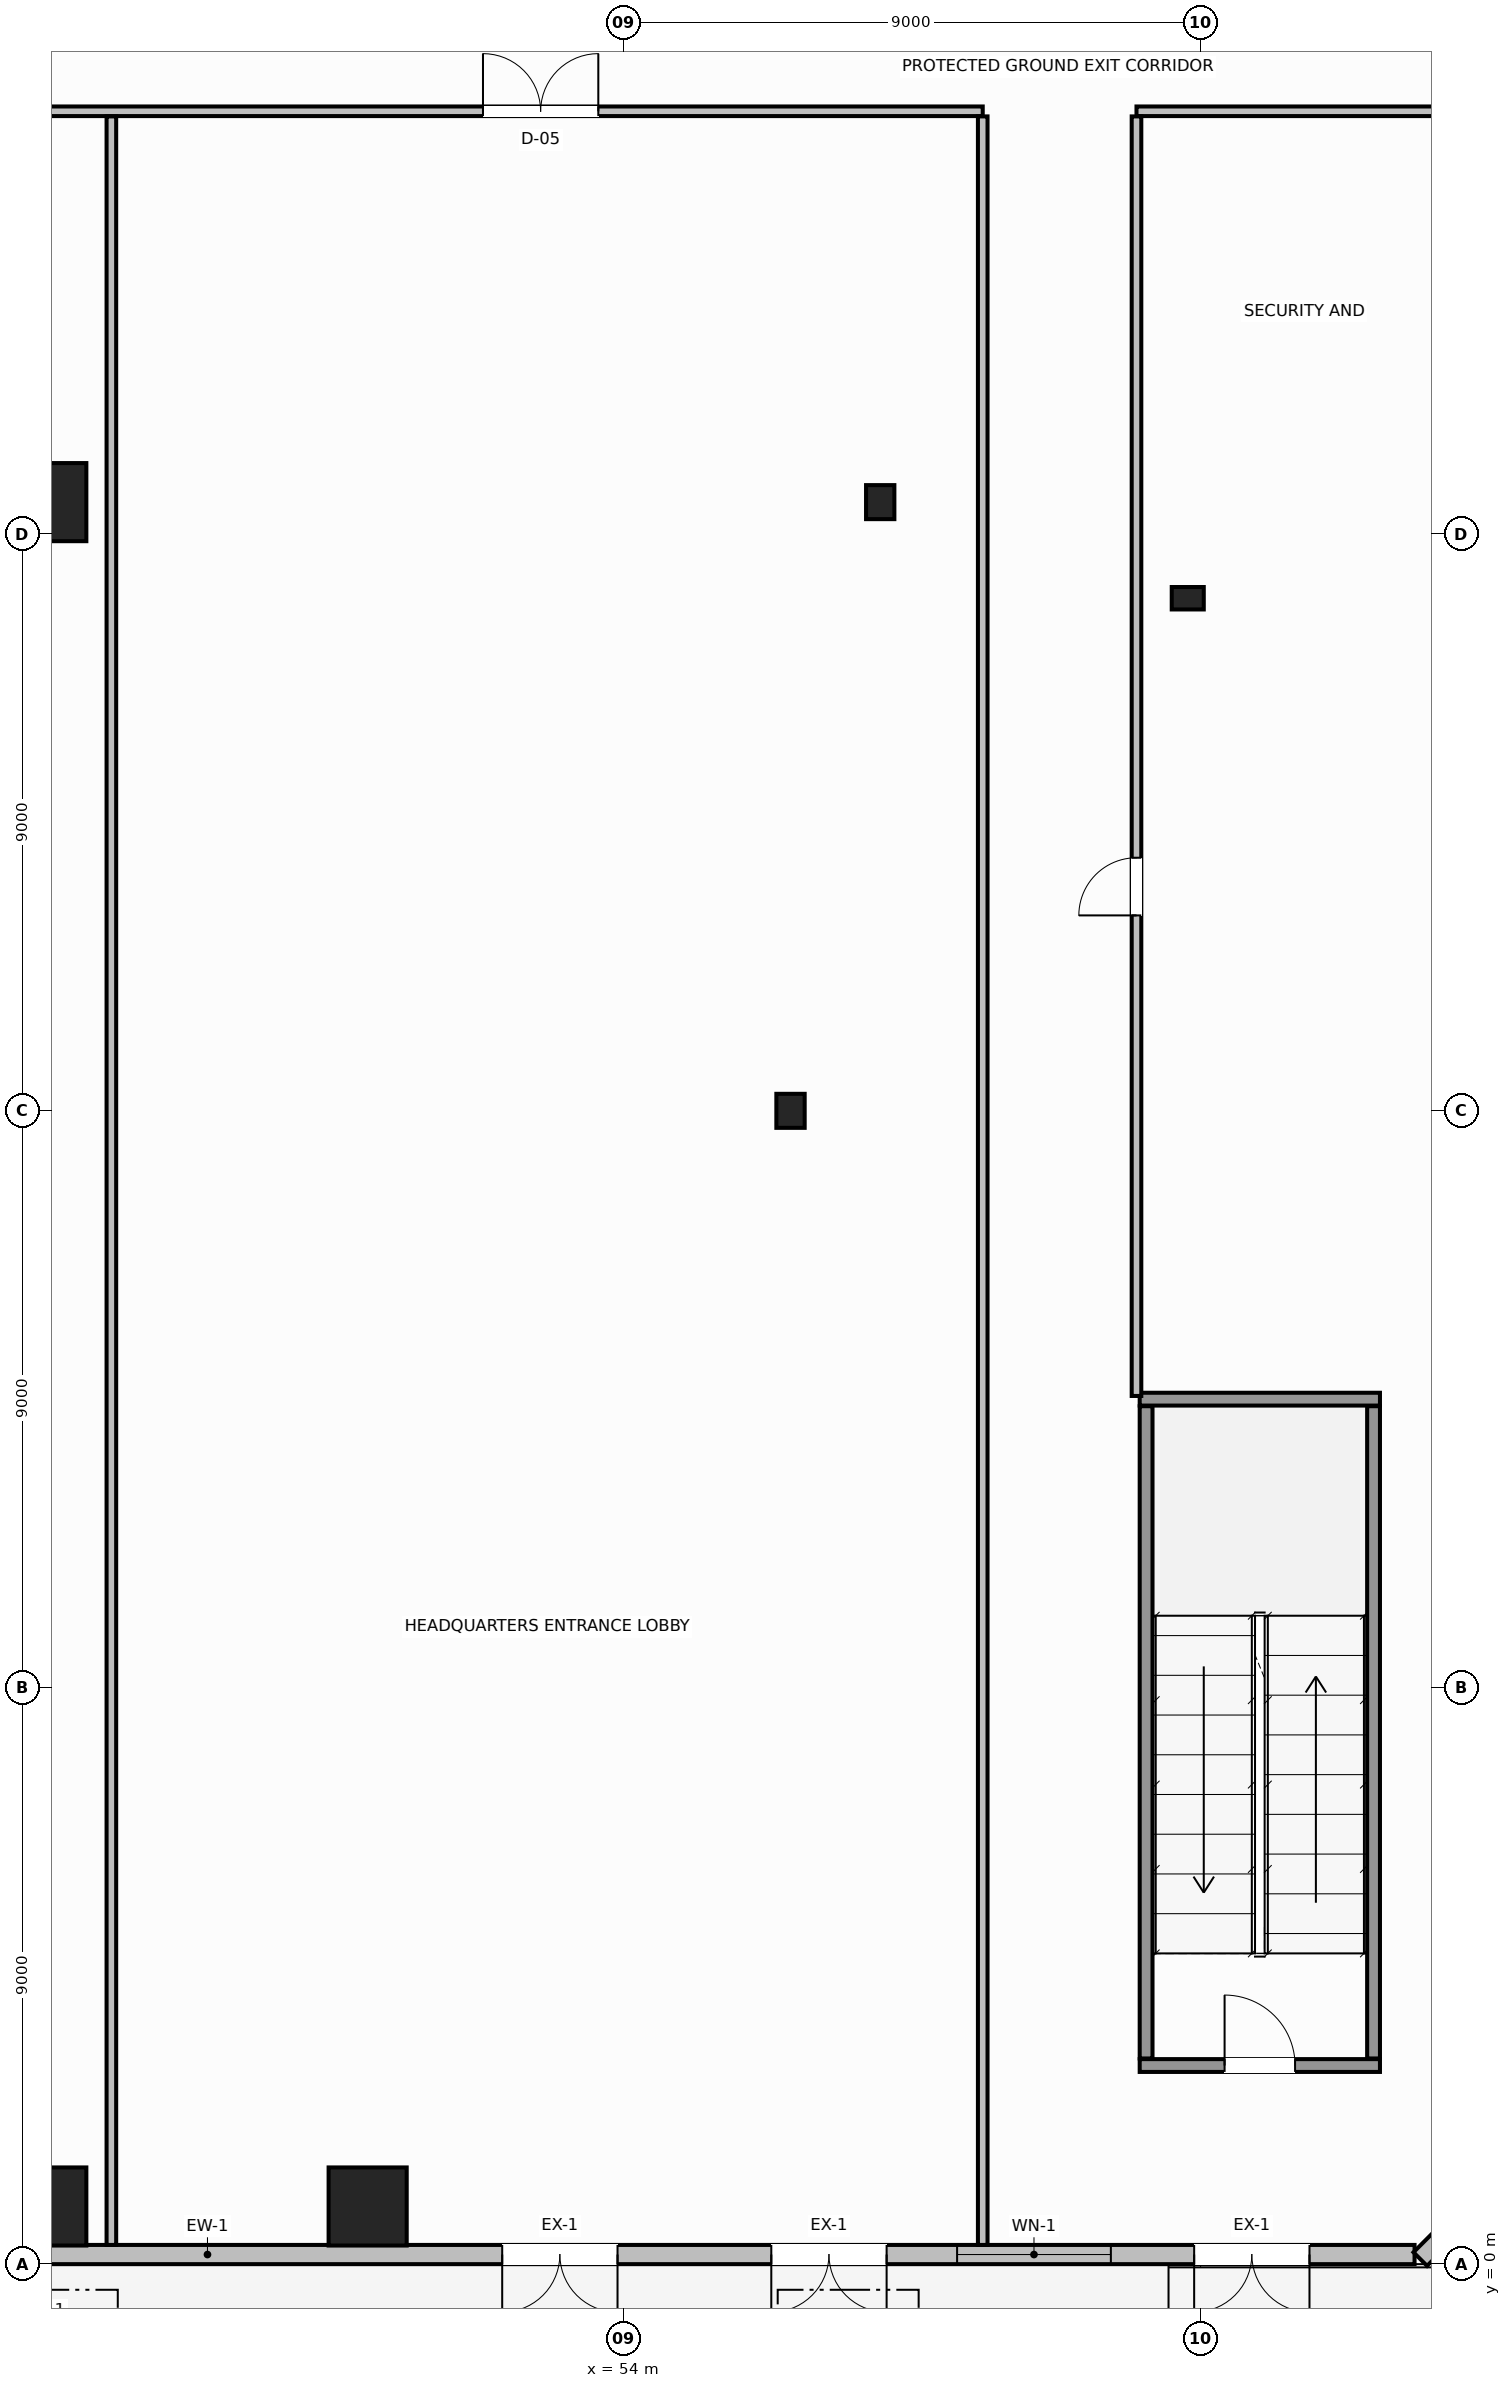
"""IFC4 building model, lengths in metres.
Left out: names, types, materials, properties, quantities, classifications, styles, units other than length and angle.
Written with IfcOpenShell. Run it as: python <this file> out.ifc"""

import sys

from ifc_helpers import new_model, si_unit, direction, frame, frame_2d, origin, origin_2d, place, context, subcontext, project, spatial, rectangle, hollow_circle, i_section, extrude, source, transform, mapped, element, fill, save


model = new_model("IFC4")
c1 = context("Model", 3, precision=1e-05, world=origin(), true_north=direction((0.0, 1.0)))
c2 = subcontext(c1, "Body", "Model", "MODEL_VIEW")
j1 = project(units=[si_unit("LENGTHUNIT", "METRE"), si_unit("PLANEANGLEUNIT", "RADIAN")], contexts=[c1])
p1 = place(None, origin())
s1 = spatial("IfcSite", under=j1, at=p1, CompositionType="ELEMENT")
p2 = place(p1, origin())
s2 = spatial("IfcBuilding", under=s1, at=p2, CompositionType="ELEMENT")
p3 = place(p2, origin())
s3 = spatial("IfcBuildingStorey", under=s2, at=p3, CompositionType="ELEMENT", Elevation=0.0)
m1 = source(origin(), c2, "Body", "SweptSolid", [
    extrude(hollow_circle(Radius=0.61, WallThickness=0.05, at=origin_2d()), origin(), (0.0, 0.0, 1.0), 5.6),
])
for number, where, z_axis, x_axis in (
    (1, (45.0, 0.9, 0.0), (0.0, 0.0, 1.0), (1.0, 0.0, 0.0)),
    (2, (50.0, 0.9, 0.0), (0.0, 0.0, 1.0), (1.0, 0.0, 0.0)),
):
    element("IfcColumn", number, at=place(p3, frame(where, z_axis=z_axis, x_axis=x_axis)), inside=s3, PredefinedType="COLUMN", context=c2, shape_type="MappedRepresentation", body=[
        mapped(m1, transform((0.0, 0.0, 0.0), scale=1.0)),
    ])
m2 = source(origin(), c2, "Body", "SweptSolid", [
    extrude(i_section(OverallWidth=0.442, OverallDepth=0.531, WebThickness=0.065, FlangeThickness=0.076, FilletRadius=0.015, at=origin_2d()), origin(), (0.0, 0.0, 1.0), 5.6),
])
for number, where, z_axis, x_axis in (
    (3, (58.0, 27.5, 0.0), (0.0, 0.0, 1.0), (1.0, 0.0, 0.0)),
    (4, (56.6, 18.0, 0.0), (0.0, 0.0, 1.0), (1.0, 0.0, 0.0)),
):
    element("IfcColumn", number, at=place(p3, frame(where, z_axis=z_axis, x_axis=x_axis)), inside=s3, PredefinedType="COLUMN", context=c2, shape_type="MappedRepresentation", body=[
        mapped(m2, transform((0.0, 0.0, 0.0), scale=1.0)),
    ])
p4 = place(p3, frame((45.0, 27.5, 0.0), z_axis=(0.0, 0.0, 1.0), x_axis=(1.0, 0.0, 0.0)))
e5 = element("IfcColumn", 5, at=p4, inside=s3, PredefinedType="COLUMN", context=c2, shape_type="MappedRepresentation", body=[
    mapped(m1, transform((0.0, 0.0, 0.0), scale=1.0)),
])
m3 = source(origin(), c2, "Body", "SweptSolid", [
    extrude(rectangle(XDim=0.5, YDim=0.35, at=origin_2d()), origin(), (0.0, 0.0, 1.0), 5.32),
])
p5 = place(p3, frame((62.8, 26.0, 0.0), z_axis=(0.0, 0.0, 1.0), x_axis=(1.0, 0.0, 0.0)))
e6 = element("IfcColumn", 6, at=p5, inside=s3, PredefinedType="PILASTER", context=c2, shape_type="MappedRepresentation", body=[
    mapped(m3, transform((0.0, 0.0, 0.0), scale=1.0)),
])
p6 = place(p3, frame((66.34, 0.15, 0.0), z_axis=(0.0, 0.0, 1.0), x_axis=(-1.0, 0.0, 0.0)))
e7 = element("IfcWall", 7, at=p6, inside=s3, PredefinedType="STANDARD", context=c2, shape_type="SweptSolid", body=[
    extrude(rectangle(XDim=64.68, YDim=0.3, at=frame_2d((32.34, 0.0))), origin(), (0.0, 0.0, 1.0), 5.32),
])
p7 = place(p6, frame((54.64, 0.0, 0.0)))
e8 = element("IfcOpeningElement", 8, at=p7, cuts=e7, PredefinedType="OPENING", context=c2, shape_type="SweptSolid", body=[
    extrude(rectangle(XDim=1.8, YDim=2.4, at=frame_2d((0.9, 1.2))), frame((0.0, 0.16, 0.0), z_axis=(0.0, -1.0, 0.0), x_axis=(1.0, 0.0, 0.0)), (0.0, 0.0, 1.0), 0.32),
])
p8 = place(p6, frame((50.24, 0.0, 0.0)))
e9 = element("IfcOpeningElement", 9, at=p8, cuts=e7, PredefinedType="OPENING", context=c2, shape_type="SweptSolid", body=[
    extrude(rectangle(XDim=1.8, YDim=2.4, at=frame_2d((0.9, 1.2))), frame((0.0, 0.16, 0.0), z_axis=(0.0, -1.0, 0.0), x_axis=(1.0, 0.0, 0.0)), (0.0, 0.0, 1.0), 0.32),
])
p9 = place(p6, frame((39.44, 0.0, 0.0)))
e10 = element("IfcOpeningElement", 10, at=p9, cuts=e7, PredefinedType="OPENING", context=c2, shape_type="SweptSolid", body=[
    extrude(rectangle(XDim=1.8, YDim=2.4, at=frame_2d((0.9, 1.2))), frame((0.0, 0.16, 0.0), z_axis=(0.0, -1.0, 0.0), x_axis=(1.0, 0.0, 0.0)), (0.0, 0.0, 1.0), 0.32),
])
p10 = place(p6, frame((31.44, 0.0, 0.0)))
e11 = element("IfcOpeningElement", 11, at=p10, cuts=e7, PredefinedType="OPENING", context=c2, shape_type="SweptSolid", body=[
    extrude(rectangle(XDim=1.8, YDim=2.4, at=frame_2d((0.9, 1.2))), frame((0.0, 0.16, 0.0), z_axis=(0.0, -1.0, 0.0), x_axis=(1.0, 0.0, 0.0)), (0.0, 0.0, 1.0), 0.32),
])
p11 = place(p6, frame((23.44, 0.0, 0.0)))
e12 = element("IfcOpeningElement", 12, at=p11, cuts=e7, PredefinedType="OPENING", context=c2, shape_type="SweptSolid", body=[
    extrude(rectangle(XDim=1.8, YDim=2.4, at=frame_2d((0.9, 1.2))), frame((0.0, 0.16, 0.0), z_axis=(0.0, -1.0, 0.0), x_axis=(1.0, 0.0, 0.0)), (0.0, 0.0, 1.0), 0.32),
])
p12 = place(p6, frame((12.44, 0.0, 0.0)))
e13 = element("IfcOpeningElement", 13, at=p12, cuts=e7, PredefinedType="OPENING", context=c2, shape_type="SweptSolid", body=[
    extrude(rectangle(XDim=1.8, YDim=2.4, at=frame_2d((0.9, 1.2))), frame((0.0, 0.16, 0.0), z_axis=(0.0, -1.0, 0.0), x_axis=(1.0, 0.0, 0.0)), (0.0, 0.0, 1.0), 0.32),
])
p13 = place(p6, frame((8.24, 0.0, 0.0)))
e14 = element("IfcOpeningElement", 14, at=p13, cuts=e7, PredefinedType="OPENING", context=c2, shape_type="SweptSolid", body=[
    extrude(rectangle(XDim=1.8, YDim=2.4, at=frame_2d((0.9, 1.2))), frame((0.0, 0.16, 0.0), z_axis=(0.0, -1.0, 0.0), x_axis=(1.0, 0.0, 0.0)), (0.0, 0.0, 1.0), 0.32),
])
p14 = place(p6, frame((1.64, 0.0, 0.0)))
e15 = element("IfcOpeningElement", 15, at=p14, cuts=e7, PredefinedType="OPENING", context=c2, shape_type="SweptSolid", body=[
    extrude(rectangle(XDim=1.8, YDim=2.4, at=frame_2d((0.9, 1.2))), frame((0.0, 0.16, 0.0), z_axis=(0.0, -1.0, 0.0), x_axis=(1.0, 0.0, 0.0)), (0.0, 0.0, 1.0), 0.32),
])
p15 = place(p6, frame((60.34, 0.0, 1.1)))
e16 = element("IfcOpeningElement", 16, at=p15, cuts=e7, PredefinedType="OPENING", context=c2, shape_type="SweptSolid", body=[
    extrude(rectangle(XDim=2.4, YDim=2.2, at=frame_2d((1.2, 1.1))), frame((0.0, 0.16, 0.0), z_axis=(0.0, -1.0, 0.0), x_axis=(1.0, 0.0, 0.0)), (0.0, 0.0, 1.0), 0.32),
])
p16 = place(p6, frame((34.94, 0.0, 1.1)))
e17 = element("IfcOpeningElement", 17, at=p16, cuts=e7, PredefinedType="OPENING", context=c2, shape_type="SweptSolid", body=[
    extrude(rectangle(XDim=2.4, YDim=2.2, at=frame_2d((1.2, 1.1))), frame((0.0, 0.16, 0.0), z_axis=(0.0, -1.0, 0.0), x_axis=(1.0, 0.0, 0.0)), (0.0, 0.0, 1.0), 0.32),
])
p17 = place(p6, frame((27.34, 0.0, 1.1)))
e18 = element("IfcOpeningElement", 18, at=p17, cuts=e7, PredefinedType="OPENING", context=c2, shape_type="SweptSolid", body=[
    extrude(rectangle(XDim=2.4, YDim=2.2, at=frame_2d((1.2, 1.1))), frame((0.0, 0.16, 0.0), z_axis=(0.0, -1.0, 0.0), x_axis=(1.0, 0.0, 0.0)), (0.0, 0.0, 1.0), 0.32),
])
p18 = place(p6, frame((4.74, 0.0, 1.1)))
e19 = element("IfcOpeningElement", 19, at=p18, cuts=e7, PredefinedType="OPENING", context=c2, shape_type="SweptSolid", body=[
    extrude(rectangle(XDim=2.4, YDim=2.2, at=frame_2d((1.2, 1.1))), frame((0.0, 0.16, 0.0), z_axis=(0.0, -1.0, 0.0), x_axis=(1.0, 0.0, 0.0)), (0.0, 0.0, 1.0), 0.32),
])
p19 = place(p3, frame((67.921, 1.571, 0.0), z_axis=(0.0, 0.0, 1.0), x_axis=(-0.707106781187, -0.707106781187, 0.0)))
e20 = element("IfcWall", 20, at=p19, inside=s3, PredefinedType="STANDARD", context=c2, shape_type="SweptSolid", body=[
    extrude(rectangle(XDim=2.109, YDim=0.3, at=frame_2d((1.055, 0.0))), origin(), (0.0, 0.0, 1.0), 5.32),
])
p20 = place(p3, frame((62.05, 3.1, 0.0), z_axis=(0.0, 0.0, 1.0), x_axis=(1.0, 0.0, 0.0)))
e21 = element("IfcWall", 21, at=p20, inside=s3, PredefinedType="SOLIDWALL", context=c2, shape_type="SweptSolid", body=[
    extrude(rectangle(XDim=3.75, YDim=0.2, at=frame_2d((1.875, 0.0))), origin(), (0.0, 0.0, 1.0), 5.6),
])
p21 = place(p20, frame((1.325, 0.0, 0.0)))
e22 = element("IfcOpeningElement", 22, at=p21, cuts=e21, PredefinedType="OPENING", context=c2, shape_type="SweptSolid", body=[
    extrude(rectangle(XDim=1.1, YDim=2.15, at=frame_2d((0.55, 1.075))), frame((0.0, 0.11, 0.0), z_axis=(0.0, -1.0, 0.0), x_axis=(1.0, 0.0, 0.0)), (0.0, 0.0, 1.0), 0.22),
])
p22 = place(p3, frame((62.05, 13.5, 0.0), z_axis=(0.0, 0.0, 1.0), x_axis=(1.0, 0.0, 0.0)))
e23 = element("IfcWall", 23, at=p22, inside=s3, PredefinedType="SOLIDWALL", context=c2, shape_type="SweptSolid", body=[
    extrude(rectangle(XDim=3.75, YDim=0.2, at=frame_2d((1.875, 0.0))), origin(), (0.0, 0.0, 1.0), 5.6),
])
for number, where, z_axis, x_axis in (
    (24, (62.15, 3.21, 0.0), (0.0, 0.0, 1.0), (0.0, 1.0, 0.0)),
    (25, (65.7, 3.21, 0.0), (0.0, 0.0, 1.0), (0.0, 1.0, 0.0)),
):
    element("IfcWall", number, at=place(p3, frame(where, z_axis=z_axis, x_axis=x_axis)), inside=s3, PredefinedType="SOLIDWALL", context=c2, shape_type="SweptSolid", body=[
        extrude(rectangle(XDim=10.18, YDim=0.2, at=frame_2d((5.09, 0.0))), origin(), (0.0, 0.0, 1.0), 5.6),
    ])
p23 = place(p3, frame((0.3, 33.6, 0.0), z_axis=(0.0, 0.0, 1.0), x_axis=(1.0, 0.0, 0.0)))
e26 = element("IfcWall", 26, at=p23, inside=s3, PredefinedType="PARTITIONING", context=c2, shape_type="SweptSolid", body=[
    extrude(rectangle(XDim=59.3, YDim=0.15, at=frame_2d((29.65, 0.0))), origin(), (0.0, 0.0, 1.0), 5.32),
])
p24 = place(p23, frame((3.5, 0.0, 0.0)))
e27 = element("IfcOpeningElement", 27, at=p24, cuts=e26, PredefinedType="OPENING", context=c2, shape_type="SweptSolid", body=[
    extrude(rectangle(XDim=1.1, YDim=2.15, at=frame_2d((0.55, 1.075))), frame((0.0, 0.085, 0.0), z_axis=(0.0, -1.0, 0.0), x_axis=(1.0, 0.0, 0.0)), (0.0, 0.0, 1.0), 0.17),
])
p25 = place(p23, frame((14.0, 0.0, 0.0)))
e28 = element("IfcOpeningElement", 28, at=p25, cuts=e26, PredefinedType="OPENING", context=c2, shape_type="SweptSolid", body=[
    extrude(rectangle(XDim=1.8, YDim=2.25, at=frame_2d((0.9, 1.125))), frame((0.0, 0.085, 0.0), z_axis=(0.0, -1.0, 0.0), x_axis=(1.0, 0.0, 0.0)), (0.0, 0.0, 1.0), 0.17),
])
p26 = place(p23, frame((32.5, 0.0, 0.0)))
e29 = element("IfcOpeningElement", 29, at=p26, cuts=e26, PredefinedType="OPENING", context=c2, shape_type="SweptSolid", body=[
    extrude(rectangle(XDim=1.8, YDim=2.25, at=frame_2d((0.9, 1.125))), frame((0.0, 0.085, 0.0), z_axis=(0.0, -1.0, 0.0), x_axis=(1.0, 0.0, 0.0)), (0.0, 0.0, 1.0), 0.17),
])
p27 = place(p23, frame((51.5, 0.0, 0.0)))
e30 = element("IfcOpeningElement", 30, at=p27, cuts=e26, PredefinedType="OPENING", context=c2, shape_type="SweptSolid", body=[
    extrude(rectangle(XDim=1.8, YDim=2.25, at=frame_2d((0.9, 1.125))), frame((0.0, 0.085, 0.0), z_axis=(0.0, -1.0, 0.0), x_axis=(1.0, 0.0, 0.0)), (0.0, 0.0, 1.0), 0.17),
])
p28 = place(p3, frame((62.0, 33.6, 0.0), z_axis=(0.0, 0.0, 1.0), x_axis=(1.0, 0.0, 0.0)))
e31 = element("IfcWall", 31, at=p28, inside=s3, PredefinedType="PARTITIONING", context=c2, shape_type="SweptSolid", body=[
    extrude(rectangle(XDim=5.7, YDim=0.15, at=frame_2d((2.85, 0.0))), origin(), (0.0, 0.0, 1.0), 5.32),
])
p29 = place(p3, frame((59.6, 0.3, 0.0), z_axis=(0.0, 0.0, 1.0), x_axis=(0.0, 1.0, 0.0)))
e32 = element("IfcWall", 32, at=p29, inside=s3, PredefinedType="PARTITIONING", context=c2, shape_type="SweptSolid", body=[
    extrude(rectangle(XDim=33.22, YDim=0.15, at=frame_2d((16.61, 0.0))), origin(), (0.0, 0.0, 1.0), 4.4),
])
p30 = place(p3, frame((62.0, 13.55, 0.0), z_axis=(0.0, 0.0, 1.0), x_axis=(0.0, 1.0, 0.0)))
e33 = element("IfcWall", 33, at=p30, inside=s3, PredefinedType="PARTITIONING", context=c2, shape_type="SweptSolid", body=[
    extrude(rectangle(XDim=19.97, YDim=0.15, at=frame_2d((9.985, 0.0))), origin(), (0.0, 0.0, 1.0), 5.32),
])
p31 = place(p30, frame((7.5, 0.0, 0.0)))
e34 = element("IfcOpeningElement", 34, at=p31, cuts=e33, PredefinedType="OPENING", context=c2, shape_type="SweptSolid", body=[
    extrude(rectangle(XDim=0.9, YDim=2.15, at=frame_2d((0.45, 1.075))), frame((0.0, 0.085, 0.0), z_axis=(0.0, -1.0, 0.0), x_axis=(1.0, 0.0, 0.0)), (0.0, 0.0, 1.0), 0.17),
])
p32 = place(p3, frame((46.0, 0.3, 0.0), z_axis=(0.0, 0.0, 1.0), x_axis=(0.0, 1.0, 0.0)))
e35 = element("IfcWall", 35, at=p32, inside=s3, PredefinedType="PARTITIONING", context=c2, shape_type="SweptSolid", body=[
    extrude(rectangle(XDim=33.22, YDim=0.15, at=frame_2d((16.61, 0.0))), origin(), (0.0, 0.0, 1.0), 5.32),
])
m4 = source(origin(), c2, "Body", "SweptSolid", [
    extrude(rectangle(XDim=1.8, YDim=2.4, at=frame_2d((0.9, 1.2))), frame((0.0, 0.025, 0.0), z_axis=(0.0, -1.0, 0.0), x_axis=(1.0, 0.0, 0.0)), (0.0, 0.0, 1.0), 0.05),
])
p33 = place(p12, origin())
e36 = element("IfcDoor", 36, at=p33, inside=s3, OperationType="DOUBLE_DOOR_SINGLE_SWING", PredefinedType="DOOR", context=c2, shape_type="MappedRepresentation", body=[
    mapped(m4, transform((0.0, 0.0, 0.0), scale=1.0)),
])
fill(e13, e36)
p34 = place(p13, origin())
e37 = element("IfcDoor", 37, at=p34, inside=s3, OperationType="DOUBLE_DOOR_SINGLE_SWING", PredefinedType="DOOR", context=c2, shape_type="MappedRepresentation", body=[
    mapped(m4, transform((0.0, 0.0, 0.0), scale=1.0)),
])
fill(e14, e37)
p35 = place(p14, origin())
e38 = element("IfcDoor", 38, at=p35, inside=s3, OperationType="DOUBLE_DOOR_SINGLE_SWING", PredefinedType="DOOR", context=c2, shape_type="MappedRepresentation", body=[
    mapped(m4, transform((0.0, 0.0, 0.0), scale=1.0)),
])
fill(e15, e38)
m5 = source(origin(), c2, "Body", "SweptSolid", [
    extrude(rectangle(XDim=2.4, YDim=2.2, at=frame_2d((1.2, 1.1))), frame((0.0, 0.03, 0.0), z_axis=(0.0, -1.0, 0.0), x_axis=(1.0, 0.0, 0.0)), (0.0, 0.0, 1.0), 0.06),
])
p36 = place(p18, origin())
e39 = element("IfcWindow", 39, at=p36, inside=s3, PartitioningType="SINGLE_PANEL", PredefinedType="WINDOW", context=c2, shape_type="MappedRepresentation", body=[
    mapped(m5, transform((0.0, 0.0, 0.0), scale=1.0)),
])
fill(e19, e39)
p37 = place(p3, frame((0.0, 0.0, 4.8)))
p38 = place(p37, frame((45.0, -1.0, 0.0)))
p39 = place(p38, frame((0.0, 0.0, 0.17)))
e40 = element("IfcWindow", 40, at=p39, inside=s3, PartitioningType="SINGLE_PANEL", PredefinedType="SKYLIGHT", context=c2, shape_type="SweptSolid", body=[
    extrude(rectangle(XDim=2.2, YDim=1.2, at=origin_2d()), origin(), (0.0, 0.0, 1.0), 0.05),
])
p40 = place(p37, frame((57.5, -1.0, 0.0)))
p41 = place(p40, frame((0.0, 0.0, 0.17)))
e41 = element("IfcWindow", 41, at=p41, inside=s3, PartitioningType="SINGLE_PANEL", PredefinedType="SKYLIGHT", context=c2, shape_type="SweptSolid", body=[
    extrude(rectangle(XDim=2.2, YDim=1.2, at=origin_2d()), origin(), (0.0, 0.0, 1.0), 0.05),
])
m6 = source(origin(), c2, "Body", "SweptSolid", [
    extrude(rectangle(XDim=1.1, YDim=2.15, at=frame_2d((0.55, 1.075))), frame((0.0, 0.025, 0.0), z_axis=(0.0, -1.0, 0.0), x_axis=(1.0, 0.0, 0.0)), (0.0, 0.0, 1.0), 0.05),
])
p42 = place(p21, origin())
e42 = element("IfcDoor", 42, at=p42, inside=s3, OperationType="SINGLE_SWING_RIGHT", PredefinedType="DOOR", context=c2, shape_type="MappedRepresentation", body=[
    mapped(m6, transform((0.0, 0.0, 0.0), scale=1.0)),
])
fill(e22, e42)
m7 = source(origin(), c2, "Body", "SweptSolid", [
    extrude(rectangle(XDim=1.8, YDim=2.25, at=frame_2d((0.9, 1.125))), frame((0.0, 0.025, 0.0), z_axis=(0.0, -1.0, 0.0), x_axis=(1.0, 0.0, 0.0)), (0.0, 0.0, 1.0), 0.05),
])
p43 = place(p27, origin())
e43 = element("IfcDoor", 43, at=p43, inside=s3, OperationType="DOUBLE_DOOR_SINGLE_SWING", PredefinedType="DOOR", context=c2, shape_type="MappedRepresentation", body=[
    mapped(m7, transform((0.0, 0.0, 0.0), scale=1.0)),
])
fill(e30, e43)
m8 = source(origin(), c2, "Body", "SweptSolid", [
    extrude(rectangle(XDim=0.9, YDim=2.15, at=frame_2d((0.45, 1.075))), frame((0.0, 0.025, 0.0), z_axis=(0.0, -1.0, 0.0), x_axis=(1.0, 0.0, 0.0)), (0.0, 0.0, 1.0), 0.05),
])
p44 = place(p31, origin())
e44 = element("IfcDoor", 44, at=p44, inside=s3, OperationType="SINGLE_SWING_RIGHT", PredefinedType="DOOR", context=c2, shape_type="MappedRepresentation", body=[
    mapped(m8, transform((0.0, 0.0, 0.0), scale=1.0)),
])
fill(e34, e44)
save(model, sys.argv[1])
